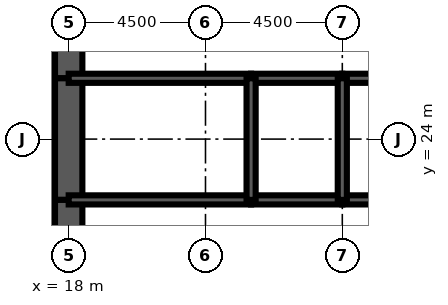
"""IFC4 building model, lengths in metres.
Left out: names, types, materials, properties, quantities, classifications, styles, units other than length and angle.
Written with IfcOpenShell. Run it as: python <this file> out.ifc"""

import sys

from ifc_helpers import new_model, si_unit, direction, frame, frame_2d, origin, place, context, subcontext, project, spatial, rectangle, extrude, element, fill, save


model = new_model("IFC4")
c1 = context("Model", 3, precision=1e-05, world=origin(), true_north=direction((0.0, 1.0)))
c2 = subcontext(c1, "Body", "Model", "MODEL_VIEW")
j1 = project(units=[si_unit("LENGTHUNIT", "METRE"), si_unit("PLANEANGLEUNIT", "RADIAN")], contexts=[c1])
p1 = place(None, origin())
s1 = spatial("IfcSite", under=j1, at=p1, CompositionType="ELEMENT")
p2 = place(p1, origin())
s2 = spatial("IfcBuilding", under=s1, at=p2, CompositionType="ELEMENT")
p3 = place(p2, frame((0.0, 0.0, 113.1)))
s3 = spatial("IfcBuildingStorey", under=s2, at=p3, CompositionType="ELEMENT", Elevation=113.1)
p4 = place(p3, frame((18.0, 28.8, 0.0), z_axis=(0.0, 0.0, 1.0), x_axis=(0.0, -1.0, 0.0)))
e1 = element("IfcWall", 1, at=p4, inside=s3, PredefinedType="SHEAR", context=c2, shape_type="SweptSolid", body=[
    extrude(rectangle(XDim=2.8, YDim=0.9, at=frame_2d((1.4, 0.0))), origin(), (0.0, 0.0, 1.0), 4.2),
])
p5 = place(p4, frame((0.4, 0.0, 0.0)))
e2 = element("IfcOpeningElement", 2, at=p5, cuts=e1, PredefinedType="OPENING", context=c2, shape_type="SweptSolid", body=[
    extrude(rectangle(XDim=1.8, YDim=2.1, at=frame_2d((0.9, 1.05))), frame((0.0, 0.46, 0.0), z_axis=(0.0, -1.0, 0.0), x_axis=(1.0, 0.0, 0.0)), (0.0, 0.0, 1.0), 0.92),
])
p6 = place(p3, frame((18.0, 26.0, 0.0), z_axis=(0.0, 0.0, 1.0), x_axis=(0.0, -1.0, 0.0)))
e3 = element("IfcWall", 3, at=p6, inside=s3, PredefinedType="SHEAR", context=c2, shape_type="SweptSolid", body=[
    extrude(rectangle(XDim=4.0, YDim=0.9, at=frame_2d((2.0, 0.0))), origin(), (0.0, 0.0, 1.0), 4.2),
])
p7 = place(p3, frame((18.0, 22.0, 0.0), z_axis=(0.0, 0.0, 1.0), x_axis=(0.0, -1.0, 0.0)))
e4 = element("IfcWall", 4, at=p7, inside=s3, PredefinedType="SHEAR", context=c2, shape_type="SweptSolid", body=[
    extrude(rectangle(XDim=2.8, YDim=0.9, at=frame_2d((1.4, 0.0))), origin(), (0.0, 0.0, 1.0), 4.2),
])
p8 = place(p7, frame((0.6, 0.0, 0.0)))
e5 = element("IfcOpeningElement", 5, at=p8, cuts=e4, PredefinedType="OPENING", context=c2, shape_type="SweptSolid", body=[
    extrude(rectangle(XDim=1.8, YDim=2.1, at=frame_2d((0.9, 1.05))), frame((0.0, 0.46, 0.0), z_axis=(0.0, -1.0, 0.0), x_axis=(1.0, 0.0, 0.0)), (0.0, 0.0, 1.0), 0.92),
])
p9 = place(p3, frame((18.0, 22.0, 0.0), z_axis=(0.0, 0.0, 1.0), x_axis=(1.0, 0.0, 0.0)))
e6 = element("IfcWall", 6, at=p9, inside=s3, PredefinedType="SOLIDWALL", context=c2, shape_type="SweptSolid", body=[
    extrude(rectangle(XDim=6.0, YDim=0.3, at=frame_2d((3.0, 0.0))), origin(), (0.0, 0.0, 1.0), 4.2),
])
p10 = place(p9, frame((4.4, 0.0, 0.0)))
e7 = element("IfcOpeningElement", 7, at=p10, cuts=e6, PredefinedType="OPENING", context=c2, shape_type="SweptSolid", body=[
    extrude(rectangle(XDim=1.0, YDim=2.1, at=frame_2d((0.5, 1.05))), frame((0.0, 0.16, 0.0), z_axis=(0.0, -1.0, 0.0), x_axis=(1.0, 0.0, 0.0)), (0.0, 0.0, 1.0), 0.32),
])
p11 = place(p9, frame((1.0, 0.0, 0.0)))
e8 = element("IfcOpeningElement", 8, at=p11, cuts=e6, PredefinedType="OPENING", context=c2, shape_type="SweptSolid", body=[
    extrude(rectangle(XDim=1.0, YDim=2.1, at=frame_2d((0.5, 1.05))), frame((0.0, 0.16, 0.0), z_axis=(0.0, -1.0, 0.0), x_axis=(1.0, 0.0, 0.0)), (0.0, 0.0, 1.0), 0.32),
])
p12 = place(p3, frame((24.0, 22.0, 0.0), z_axis=(0.0, 0.0, 1.0), x_axis=(1.0, 0.0, 0.0)))
e9 = element("IfcWall", 9, at=p12, inside=s3, PredefinedType="SOLIDWALL", context=c2, shape_type="SweptSolid", body=[
    extrude(rectangle(XDim=3.0, YDim=0.3, at=frame_2d((1.5, 0.0))), origin(), (0.0, 0.0, 1.0), 4.2),
])
p13 = place(p12, frame((1.0, 0.0, 0.0)))
e10 = element("IfcOpeningElement", 10, at=p13, cuts=e9, PredefinedType="OPENING", context=c2, shape_type="SweptSolid", body=[
    extrude(rectangle(XDim=1.0, YDim=2.1, at=frame_2d((0.5, 1.05))), frame((0.0, 0.16, 0.0), z_axis=(0.0, -1.0, 0.0), x_axis=(1.0, 0.0, 0.0)), (0.0, 0.0, 1.0), 0.32),
])
p14 = place(p3, frame((27.0, 22.0, 0.0), z_axis=(0.0, 0.0, 1.0), x_axis=(1.0, 0.0, 0.0)))
e11 = element("IfcWall", 11, at=p14, inside=s3, PredefinedType="SOLIDWALL", context=c2, shape_type="SweptSolid", body=[
    extrude(rectangle(XDim=9.0, YDim=0.3, at=frame_2d((4.5, 0.0))), origin(), (0.0, 0.0, 1.0), 4.2),
])
p15 = place(p14, frame((4.0, 0.0, 0.0)))
e12 = element("IfcOpeningElement", 12, at=p15, cuts=e11, PredefinedType="OPENING", context=c2, shape_type="SweptSolid", body=[
    extrude(rectangle(XDim=1.0, YDim=2.1, at=frame_2d((0.5, 1.05))), frame((0.0, 0.16, 0.0), z_axis=(0.0, -1.0, 0.0), x_axis=(1.0, 0.0, 0.0)), (0.0, 0.0, 1.0), 0.32),
])
p16 = place(p3, frame((18.0, 26.0, 0.0), z_axis=(0.0, 0.0, 1.0), x_axis=(1.0, 0.0, 0.0)))
e13 = element("IfcWall", 13, at=p16, inside=s3, PredefinedType="SOLIDWALL", context=c2, shape_type="SweptSolid", body=[
    extrude(rectangle(XDim=6.0, YDim=0.3, at=frame_2d((3.0, 0.0))), origin(), (0.0, 0.0, 1.0), 4.2),
])
p17 = place(p3, frame((24.0, 26.0, 0.0), z_axis=(0.0, 0.0, 1.0), x_axis=(1.0, 0.0, 0.0)))
e14 = element("IfcWall", 14, at=p17, inside=s3, PredefinedType="SOLIDWALL", context=c2, shape_type="SweptSolid", body=[
    extrude(rectangle(XDim=3.0, YDim=0.3, at=frame_2d((1.5, 0.0))), origin(), (0.0, 0.0, 1.0), 4.2),
])
p18 = place(p3, frame((27.0, 26.0, 0.0), z_axis=(0.0, 0.0, 1.0), x_axis=(1.0, 0.0, 0.0)))
e15 = element("IfcWall", 15, at=p18, inside=s3, PredefinedType="SOLIDWALL", context=c2, shape_type="SweptSolid", body=[
    extrude(rectangle(XDim=9.0, YDim=0.3, at=frame_2d((4.5, 0.0))), origin(), (0.0, 0.0, 1.0), 4.2),
])
for number, where, z_axis, x_axis in (
    (16, (24.0, 22.0, 0.0), (0.0, 0.0, 1.0), (0.0, 1.0, 0.0)),
    (17, (27.0, 22.0, 0.0), (0.0, 0.0, 1.0), (0.0, 1.0, 0.0)),
):
    element("IfcWall", number, at=place(p3, frame(where, z_axis=z_axis, x_axis=x_axis)), inside=s3, PredefinedType="SOLIDWALL", context=c2, shape_type="SweptSolid", body=[
        extrude(rectangle(XDim=4.0, YDim=0.3, at=frame_2d((2.0, 0.0))), origin(), (0.0, 0.0, 1.0), 4.2),
    ])
p19 = place(p3, frame((20.625, 22.15, 0.0), z_axis=(0.0, 0.0, 1.0), x_axis=(0.0, 1.0, 0.0)))
e18 = element("IfcWall", 18, at=p19, inside=s3, PredefinedType="PARTITIONING", context=c2, shape_type="SweptSolid", body=[
    extrude(rectangle(XDim=3.7, YDim=0.15, at=frame_2d((1.85, 0.0))), origin(), (0.0, 0.0, 1.0), 3.0),
])
p20 = place(p8, origin())
e19 = element("IfcDoor", 19, at=p20, inside=s3, OperationType="SINGLE_SWING_LEFT", PredefinedType="DOOR", context=c2, shape_type="SweptSolid", body=[
    extrude(rectangle(XDim=1.8, YDim=2.1, at=frame_2d((0.9, 1.05))), frame((0.0, 0.45, 0.0), z_axis=(0.0, -1.0, 0.0), x_axis=(1.0, 0.0, 0.0)), (0.0, 0.0, 1.0), 0.899),
])
fill(e5, e19)
p21 = place(p5, origin())
e20 = element("IfcDoor", 20, at=p21, inside=s3, OperationType="SINGLE_SWING_LEFT", PredefinedType="DOOR", context=c2, shape_type="SweptSolid", body=[
    extrude(rectangle(XDim=1.8, YDim=2.1, at=frame_2d((0.9, 1.05))), frame((0.0, 0.45, 0.0), z_axis=(0.0, -1.0, 0.0), x_axis=(1.0, 0.0, 0.0)), (0.0, 0.0, 1.0), 0.899),
])
fill(e2, e20)
p22 = place(p10, origin())
e21 = element("IfcDoor", 21, at=p22, inside=s3, OperationType="SINGLE_SWING_RIGHT", PredefinedType="DOOR", context=c2, shape_type="SweptSolid", body=[
    extrude(rectangle(XDim=1.0, YDim=2.1, at=frame_2d((0.5, 1.05))), frame((0.0, 0.025, 0.0), z_axis=(0.0, -1.0, 0.0), x_axis=(1.0, 0.0, 0.0)), (0.0, 0.0, 1.0), 0.05),
])
fill(e7, e21)
p23 = place(p13, origin())
e22 = element("IfcDoor", 22, at=p23, inside=s3, OperationType="SINGLE_SWING_LEFT", PredefinedType="DOOR", context=c2, shape_type="SweptSolid", body=[
    extrude(rectangle(XDim=1.0, YDim=2.1, at=frame_2d((0.5, 1.05))), frame((0.0, 0.025, 0.0), z_axis=(0.0, -1.0, 0.0), x_axis=(1.0, 0.0, 0.0)), (0.0, 0.0, 1.0), 0.05),
])
fill(e10, e22)
p24 = place(p11, origin())
e23 = element("IfcDoor", 23, at=p24, inside=s3, OperationType="SINGLE_SWING_LEFT", PredefinedType="DOOR", context=c2, shape_type="SweptSolid", body=[
    extrude(rectangle(XDim=1.0, YDim=2.1, at=frame_2d((0.5, 1.05))), frame((0.0, 0.025, 0.0), z_axis=(0.0, -1.0, 0.0), x_axis=(1.0, 0.0, 0.0)), (0.0, 0.0, 1.0), 0.05),
])
fill(e8, e23)
save(model, sys.argv[1])
